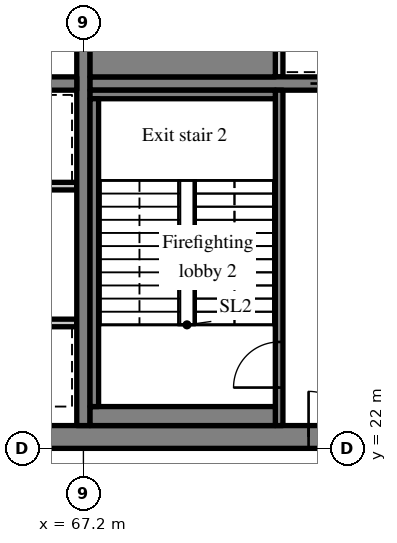
"""IFC4 building model, lengths in metres.
Left out: names, types, materials, properties, quantities, classifications, styles, units other than length and angle.
Written with IfcOpenShell. Run it as: python <this file> out.ifc"""

import sys

from ifc_helpers import new_model, si_unit, direction, frame, frame_2d, origin, place, context, subcontext, project, spatial, rectangle, extrude, source, transform, mapped, element, fill, save


model = new_model("IFC4")
c1 = context("Model", 3, precision=1e-05, world=origin(), true_north=direction((0.0, 1.0)))
c2 = subcontext(c1, "Body", "Model", "MODEL_VIEW")
j1 = project(units=[si_unit("LENGTHUNIT", "METRE"), si_unit("PLANEANGLEUNIT", "RADIAN")], contexts=[c1])
p1 = place(None, origin())
s1 = spatial("IfcSite", under=j1, at=p1, CompositionType="ELEMENT")
p2 = place(p1, origin())
s2 = spatial("IfcBuilding", under=s1, at=p2, CompositionType="ELEMENT")
p3 = place(p2, frame((0.0, 0.0, 214.0)))
s3 = spatial("IfcBuildingStorey", under=s2, at=p3, CompositionType="ELEMENT", Elevation=214.0)
m1 = source(origin(), c2, "Body", "SweptSolid", [
    extrude(rectangle(XDim=50.4, YDim=0.6, at=frame_2d((25.2, 0.0))), origin(), (0.0, 0.0, 1.0), 3.62),
])
p4 = place(p3, frame((25.2, 22.3, 0.0), z_axis=(0.0, 0.0, 1.0), x_axis=(1.0, 0.0, 0.0)))
e1 = element("IfcWall", 1, at=p4, inside=s3, PredefinedType="SHEAR", context=c2, shape_type="MappedRepresentation", body=[
    mapped(m1, transform((0.0, 0.0, 0.0), scale=1.0)),
])
m2 = source(origin(), c2, "Body", "SweptSolid", [
    extrude(rectangle(XDim=1.8, YDim=2.1, at=frame_2d((0.9, 1.05))), frame((0.0, 0.31, 0.0), z_axis=(0.0, -1.0, 0.0), x_axis=(1.0, 0.0, 0.0)), (0.0, 0.0, 1.0), 0.62),
])
p5 = place(p4, frame((15.9, 0.0, 0.0)))
e2 = element("IfcOpeningElement", 2, at=p5, cuts=e1, PredefinedType="OPENING", context=c2, shape_type="MappedRepresentation", body=[
    mapped(m2, transform((0.0, 0.0, 0.0), scale=1.0)),
])
m3 = source(origin(), c2, "Body", "SweptSolid", [
    extrude(rectangle(XDim=0.9, YDim=2.1, at=frame_2d((0.45, 1.05))), frame((0.0, 0.31, 0.0), z_axis=(0.0, -1.0, 0.0), x_axis=(1.0, 0.0, 0.0)), (0.0, 0.0, 1.0), 0.62),
])
p6 = place(p4, frame((9.687, 0.0, 0.0)))
e3 = element("IfcOpeningElement", 3, at=p6, cuts=e1, PredefinedType="OPENING", context=c2, shape_type="MappedRepresentation", body=[
    mapped(m3, transform((0.0, 0.0, 0.0), scale=1.0)),
])
p7 = place(p4, frame((21.513, 0.0, 0.0)))
e4 = element("IfcOpeningElement", 4, at=p7, cuts=e1, PredefinedType="OPENING", context=c2, shape_type="MappedRepresentation", body=[
    mapped(m3, transform((0.0, 0.0, 0.0), scale=1.0)),
])
p8 = place(p4, frame((32.7, 0.0, 0.0)))
e5 = element("IfcOpeningElement", 5, at=p8, cuts=e1, PredefinedType="OPENING", context=c2, shape_type="MappedRepresentation", body=[
    mapped(m2, transform((0.0, 0.0, 0.0), scale=1.0)),
])
m4 = source(origin(), c2, "Body", "SweptSolid", [
    extrude(rectangle(XDim=1.2, YDim=2.1, at=frame_2d((0.6, 1.05))), frame((0.0, 0.31, 0.0), z_axis=(0.0, -1.0, 0.0), x_axis=(1.0, 0.0, 0.0)), (0.0, 0.0, 1.0), 0.62),
])
p9 = place(p4, frame((6.488, 0.0, 0.0)))
e6 = element("IfcOpeningElement", 6, at=p9, cuts=e1, PredefinedType="OPENING", context=c2, shape_type="MappedRepresentation", body=[
    mapped(m4, transform((0.0, 0.0, 0.0), scale=1.0)),
])
p10 = place(p4, frame((47.925, 0.0, 0.0)))
e7 = element("IfcOpeningElement", 7, at=p10, cuts=e1, PredefinedType="OPENING", context=c2, shape_type="MappedRepresentation", body=[
    mapped(m4, transform((0.0, 0.0, 0.0), scale=1.0)),
])
m5 = source(origin(), c2, "Body", "SweptSolid", [
    extrude(rectangle(XDim=18.8, YDim=0.35, at=frame_2d((9.4, 0.0))), origin(), (0.0, 0.0, 1.0), 3.62),
])
p11 = place(p3, frame((67.2, 22.6, 0.0), z_axis=(0.0, 0.0, 1.0), x_axis=(0.0, 1.0, 0.0)))
e8 = element("IfcWall", 8, at=p11, inside=s3, PredefinedType="SHEAR", context=c2, shape_type="MappedRepresentation", body=[
    mapped(m5, transform((0.0, 0.0, 0.0), scale=1.0)),
])
m6 = source(origin(), c2, "Body", "SweptSolid", [
    extrude(rectangle(XDim=16.45, YDim=0.35, at=frame_2d((8.225, 0.0))), origin(), (0.0, 0.0, 1.0), 3.62),
])
p12 = place(p3, frame((50.575, 31.6, 0.0), z_axis=(0.0, 0.0, 1.0), x_axis=(1.0, 0.0, 0.0)))
e9 = element("IfcWall", 9, at=p12, inside=s3, PredefinedType="SHEAR", context=c2, shape_type="MappedRepresentation", body=[
    mapped(m6, transform((0.0, 0.0, 0.0), scale=1.0)),
])
m7 = source(origin(), c2, "Body", "SweptSolid", [
    extrude(rectangle(XDim=1.0, YDim=2.1, at=frame_2d((0.5, 1.05))), frame((0.0, 0.185, 0.0), z_axis=(0.0, -1.0, 0.0), x_axis=(1.0, 0.0, 0.0)), (0.0, 0.0, 1.0), 0.37),
])
p13 = place(p12, frame((0.613, 0.0, 0.0)))
e10 = element("IfcOpeningElement", 10, at=p13, cuts=e9, PredefinedType="OPENING", context=c2, shape_type="MappedRepresentation", body=[
    mapped(m7, transform((0.0, 0.0, 0.0), scale=1.0)),
])
m8 = source(origin(), c2, "Body", "SweptSolid", [
    extrude(rectangle(XDim=7.625, YDim=0.35, at=frame_2d((3.812, 0.0))), origin(), (0.0, 0.0, 1.0), 3.62),
])
p14 = place(p3, frame((67.375, 31.6, 0.0), z_axis=(0.0, 0.0, 1.0), x_axis=(1.0, 0.0, 0.0)))
e11 = element("IfcWall", 11, at=p14, inside=s3, PredefinedType="SHEAR", context=c2, shape_type="MappedRepresentation", body=[
    mapped(m8, transform((0.0, 0.0, 0.0), scale=1.0)),
])
m9 = source(origin(), c2, "Body", "SweptSolid", [
    extrude(rectangle(XDim=1.1, YDim=2.1, at=frame_2d((0.55, 1.05))), frame((0.0, 0.185, 0.0), z_axis=(0.0, -1.0, 0.0), x_axis=(1.0, 0.0, 0.0)), (0.0, 0.0, 1.0), 0.37),
])
p15 = place(p14, frame((5.8, 0.0, 0.0)))
e12 = element("IfcOpeningElement", 12, at=p15, cuts=e11, PredefinedType="OPENING", context=c2, shape_type="MappedRepresentation", body=[
    mapped(m9, transform((0.0, 0.0, 0.0), scale=1.0)),
])
m10 = source(origin(), c2, "Body", "SweptSolid", [
    extrude(rectangle(XDim=6.125, YDim=0.2, at=frame_2d((3.062, 0.0))), origin(), (0.0, 0.0, 1.0), 3.62),
])
p16 = place(p3, frame((67.025, 25.3, 0.0), z_axis=(0.0, 0.0, 1.0), x_axis=(-1.0, 0.0, 0.0)))
e13 = element("IfcWall", 13, at=p16, inside=s3, PredefinedType="SOLIDWALL", context=c2, shape_type="MappedRepresentation", body=[
    mapped(m10, transform((0.0, 0.0, 0.0), scale=1.0)),
])
m11 = source(origin(), c2, "Body", "SweptSolid", [
    extrude(rectangle(XDim=1.1, YDim=2.1, at=frame_2d((0.55, 1.05))), frame((0.0, 0.11, 0.0), z_axis=(0.0, -1.0, 0.0), x_axis=(1.0, 0.0, 0.0)), (0.0, 0.0, 1.0), 0.22),
])
p17 = place(p16, frame((1.075, 0.0, 0.0)))
e14 = element("IfcOpeningElement", 14, at=p17, cuts=e13, PredefinedType="OPENING", context=c2, shape_type="MappedRepresentation", body=[
    mapped(m11, transform((0.0, 0.0, 0.0), scale=1.0)),
])
p18 = place(p16, frame((4.075, 0.0, 0.0)))
e15 = element("IfcOpeningElement", 15, at=p18, cuts=e13, PredefinedType="OPENING", context=c2, shape_type="MappedRepresentation", body=[
    mapped(m11, transform((0.0, 0.0, 0.0), scale=1.0)),
])
m12 = source(origin(), c2, "Body", "SweptSolid", [
    extrude(rectangle(XDim=12.125, YDim=0.2, at=frame_2d((6.062, 0.0))), origin(), (0.0, 0.0, 1.0), 3.62),
])
p19 = place(p3, frame((67.025, 28.9, 0.0), z_axis=(0.0, 0.0, 1.0), x_axis=(-1.0, 0.0, 0.0)))
e16 = element("IfcWall", 16, at=p19, inside=s3, PredefinedType="SOLIDWALL", context=c2, shape_type="MappedRepresentation", body=[
    mapped(m12, transform((0.0, 0.0, 0.0), scale=1.0)),
])
p20 = place(p19, frame((1.075, 0.0, 0.0)))
e17 = element("IfcOpeningElement", 17, at=p20, cuts=e16, PredefinedType="OPENING", context=c2, shape_type="MappedRepresentation", body=[
    mapped(m11, transform((0.0, 0.0, 0.0), scale=1.0)),
])
p21 = place(p19, frame((4.075, 0.0, 0.0)))
e18 = element("IfcOpeningElement", 18, at=p21, cuts=e16, PredefinedType="OPENING", context=c2, shape_type="MappedRepresentation", body=[
    mapped(m11, transform((0.0, 0.0, 0.0), scale=1.0)),
])
m13 = source(origin(), c2, "Body", "SweptSolid", [
    extrude(rectangle(XDim=8.825, YDim=0.2, at=frame_2d((4.413, 0.0))), origin(), (0.0, 0.0, 1.0), 3.62),
])
p22 = place(p3, frame((72.35, 22.6, 0.0), z_axis=(0.0, 0.0, 1.0), x_axis=(0.0, 1.0, 0.0)))
e19 = element("IfcWall", 19, at=p22, inside=s3, PredefinedType="SOLIDWALL", context=c2, shape_type="MappedRepresentation", body=[
    mapped(m13, transform((0.0, 0.0, 0.0), scale=1.0)),
])
m14 = source(origin(), c2, "Body", "SweptSolid", [
    extrude(rectangle(XDim=1.2, YDim=2.1, at=frame_2d((0.6, 1.05))), frame((0.0, 0.11, 0.0), z_axis=(0.0, -1.0, 0.0), x_axis=(1.0, 0.0, 0.0)), (0.0, 0.0, 1.0), 0.22),
])
p23 = place(p22, frame((1.0, 0.0, 0.0)))
e20 = element("IfcOpeningElement", 20, at=p23, cuts=e19, PredefinedType="OPENING", context=c2, shape_type="MappedRepresentation", body=[
    mapped(m14, transform((0.0, 0.0, 0.0), scale=1.0)),
])
m15 = source(origin(), c2, "Body", "SweptSolid", [
    extrude(rectangle(XDim=1.825, YDim=0.2, at=frame_2d((0.913, 0.0))), origin(), (0.0, 0.0, 1.0), 3.62),
])
p24 = place(p3, frame((72.35, 31.775, 0.0), z_axis=(0.0, 0.0, 1.0), x_axis=(0.0, 1.0, 0.0)))
e21 = element("IfcWall", 21, at=p24, inside=s3, PredefinedType="SOLIDWALL", context=c2, shape_type="MappedRepresentation", body=[
    mapped(m15, transform((0.0, 0.0, 0.0), scale=1.0)),
])
m16 = source(origin(), c2, "Body", "SweptSolid", [
    extrude(rectangle(XDim=4.875, YDim=0.5, at=frame_2d((2.438, 0.0))), origin(), (0.0, 0.0, 1.0), 3.62),
])
p25 = place(p3, frame((67.375, 22.85, 0.0), z_axis=(0.0, 0.0, 1.0), x_axis=(1.0, 0.0, 0.0)))
e22 = element("IfcWall", 22, at=p25, inside=s3, PredefinedType="SOLIDWALL", context=c2, shape_type="MappedRepresentation", body=[
    mapped(m16, transform((0.0, 0.0, 0.0), scale=1.0)),
])
m17 = source(origin(), c2, "Body", "SweptSolid", [
    extrude(rectangle(XDim=4.875, YDim=0.225, at=frame_2d((2.438, 0.0))), origin(), (0.0, 0.0, 1.0), 3.62),
])
p26 = place(p3, frame((67.375, 31.312, 0.0), z_axis=(0.0, 0.0, 1.0), x_axis=(1.0, 0.0, 0.0)))
e23 = element("IfcWall", 23, at=p26, inside=s3, PredefinedType="SOLIDWALL", context=c2, shape_type="MappedRepresentation", body=[
    mapped(m17, transform((0.0, 0.0, 0.0), scale=1.0)),
])
m18 = source(origin(), c2, "Body", "SweptSolid", [
    extrude(rectangle(XDim=8.1, YDim=0.225, at=frame_2d((4.05, 0.0))), origin(), (0.0, 0.0, 1.0), 3.62),
])
p27 = place(p3, frame((67.487, 23.1, 0.0), z_axis=(0.0, 0.0, 1.0), x_axis=(0.0, 1.0, 0.0)))
e24 = element("IfcWall", 24, at=p27, inside=s3, PredefinedType="SOLIDWALL", context=c2, shape_type="MappedRepresentation", body=[
    mapped(m18, transform((0.0, 0.0, 0.0), scale=1.0)),
])
m19 = source(origin(), c2, "Body", "SweptSolid", [
    extrude(rectangle(XDim=4.875, YDim=1.025, at=frame_2d((2.438, 0.0))), origin(), (0.0, 0.0, 1.0), 3.62),
])
p28 = place(p3, frame((67.375, 32.287, 0.0), z_axis=(0.0, 0.0, 1.0), x_axis=(1.0, 0.0, 0.0)))
e25 = element("IfcWall", 25, at=p28, inside=s3, PredefinedType="SOLIDWALL", context=c2, shape_type="MappedRepresentation", body=[
    mapped(m19, transform((0.0, 0.0, 0.0), scale=1.0)),
])
m20 = source(origin(), c2, "Body", "SweptSolid", [
    extrude(rectangle(XDim=1.2, YDim=2.1, at=frame_2d((0.6, 1.05))), frame((0.0, 0.025, 0.0), z_axis=(0.0, -1.0, 0.0), x_axis=(1.0, 0.0, 0.0)), (0.0, 0.0, 1.0), 0.05),
])
p29 = place(p23, origin())
e26 = element("IfcDoor", 26, at=p29, inside=s3, OperationType="SINGLE_SWING_LEFT", PredefinedType="DOOR", context=c2, shape_type="MappedRepresentation", body=[
    mapped(m20, transform((0.0, 0.0, 0.0), scale=1.0)),
])
fill(e20, e26)
m21 = source(origin(), c2, "Body", "SweptSolid", [
    extrude(rectangle(XDim=1.2, YDim=2.1, at=frame_2d((0.6, 1.05))), frame((0.0, 0.225, 0.0), z_axis=(0.0, -1.0, 0.0), x_axis=(1.0, 0.0, 0.0)), (0.0, 0.0, 1.0), 0.05),
])
p30 = place(p10, origin())
e27 = element("IfcDoor", 27, at=p30, inside=s3, OperationType="SINGLE_SWING_LEFT", PredefinedType="DOOR", context=c2, shape_type="MappedRepresentation", body=[
    mapped(m21, transform((0.0, 0.0, 0.0), scale=1.0)),
])
fill(e7, e27)
m22 = source(origin(), c2, "Body", "SweptSolid", [
    extrude(rectangle(XDim=1.1, YDim=2.1, at=frame_2d((0.55, 1.05))), frame((0.0, 0.025, 0.0), z_axis=(0.0, -1.0, 0.0), x_axis=(1.0, 0.0, 0.0)), (0.0, 0.0, 1.0), 0.05),
])
p31 = place(p15, origin())
e28 = element("IfcDoor", 28, at=p31, inside=s3, OperationType="SLIDING_TO_LEFT", PredefinedType="DOOR", context=c2, shape_type="MappedRepresentation", body=[
    mapped(m22, transform((0.0, 0.0, 0.0), scale=1.0)),
])
fill(e12, e28)
save(model, sys.argv[1])
